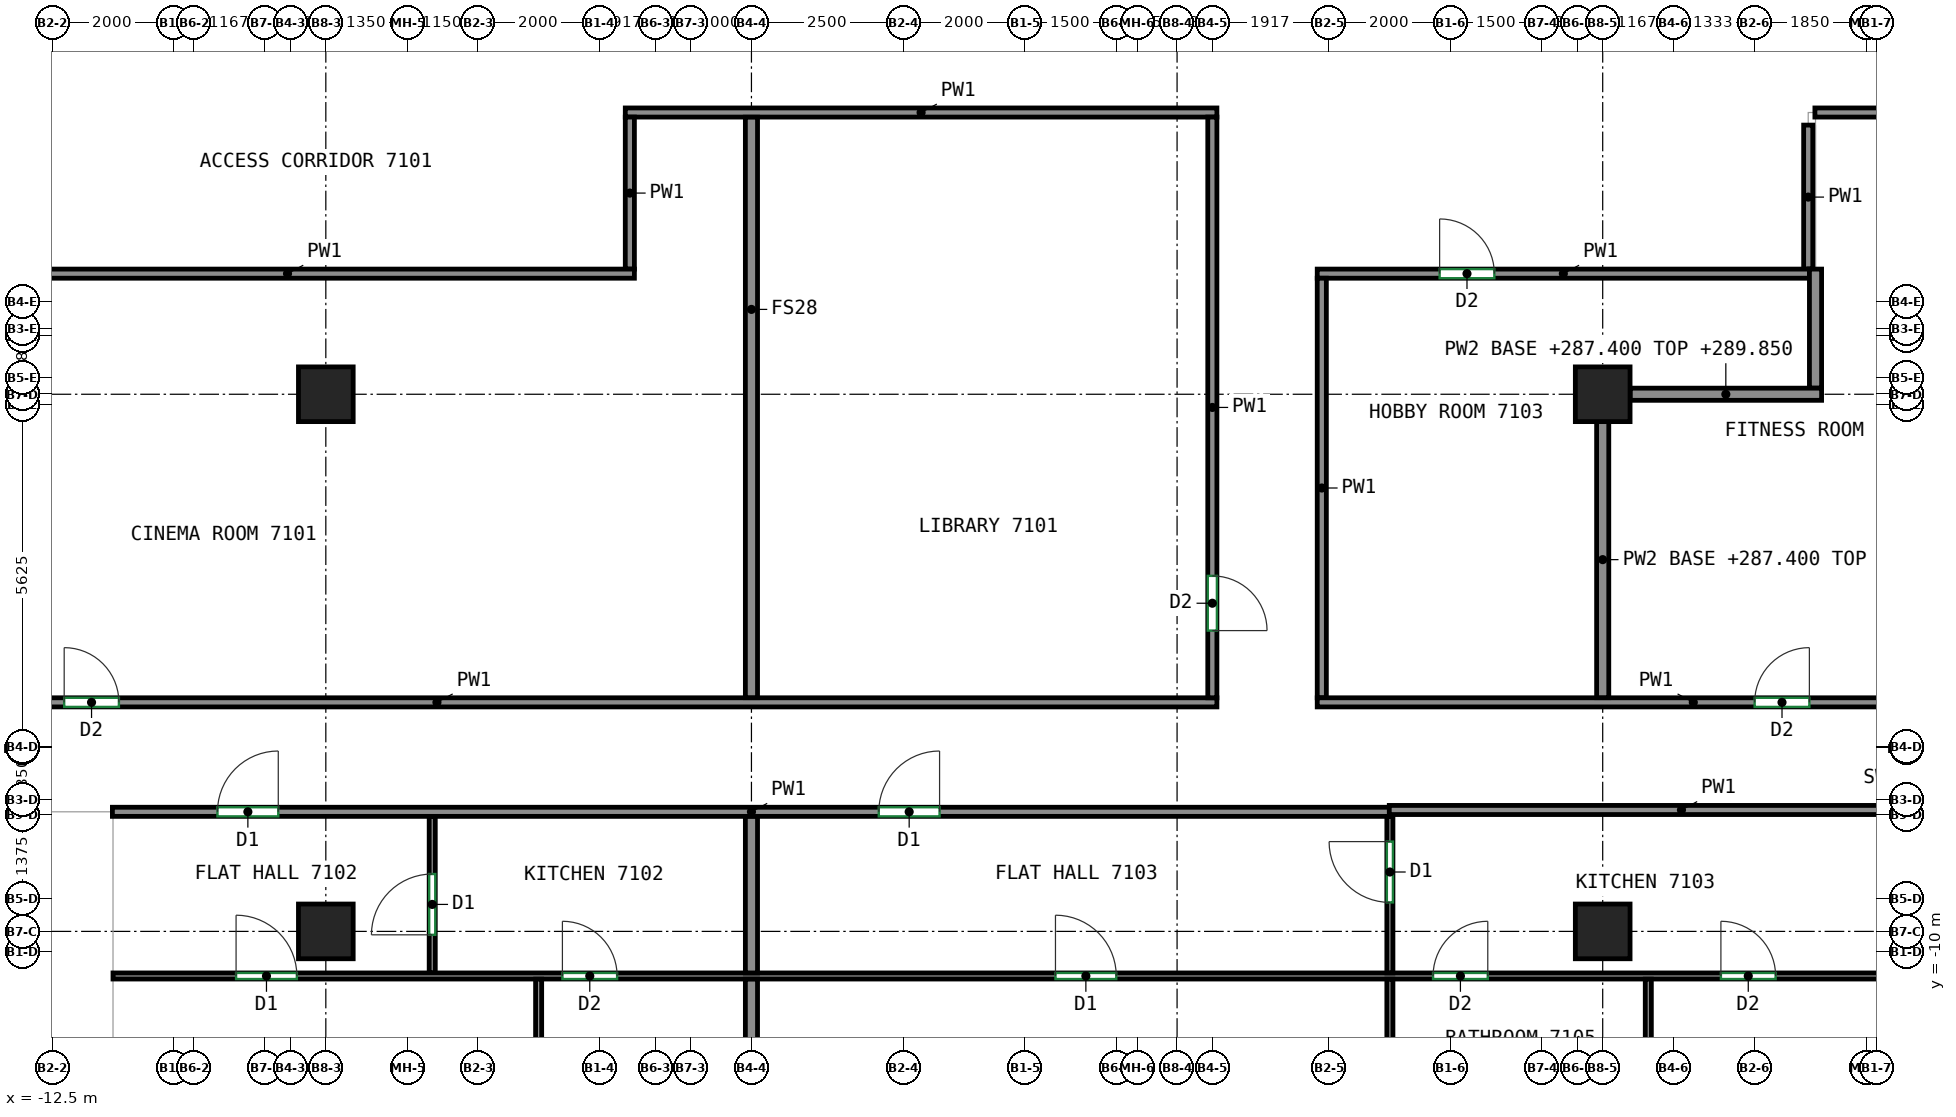
"""IFC4 building model, lengths in metres.
Left out: names, types, materials, properties, quantities, classifications, styles, units other than length and angle.
Written with IfcOpenShell. Run it as: python <this file> out.ifc"""

import sys

from ifc_helpers import new_model, si_unit, direction, frame, frame_2d, origin, origin_2d, place, context, subcontext, project, spatial, rectangle, extrude, source, transform, mapped, element, fill, save


model = new_model("IFC4")
c1 = context("Model", 3, precision=1e-05, world=origin(), true_north=direction((0.0, 1.0)))
c2 = subcontext(c1, "Body", "Model", "MODEL_VIEW")
j1 = project(units=[si_unit("LENGTHUNIT", "METRE"), si_unit("PLANEANGLEUNIT", "RADIAN")], contexts=[c1])
p1 = place(None, origin())
s1 = spatial("IfcSite", under=j1, at=p1, CompositionType="ELEMENT")
p2 = place(p1, origin())
s2 = spatial("IfcBuilding", under=s1, at=p2, CompositionType="ELEMENT")
p3 = place(p2, frame((0.0, 0.0, 287.4)))
s3 = spatial("IfcBuildingStorey", under=s2, at=p3, CompositionType="ELEMENT", Elevation=287.4)
m1 = source(origin(), c2, "Body", "SweptSolid", [
    extrude(rectangle(XDim=0.9, YDim=0.9, at=origin_2d()), origin(), (0.0, 0.0, 1.0), 3.0),
])
for number, where, z_axis, x_axis in (
    (1, (-8.0, -9.667, 0.0), (0.0, 0.0, 1.0), (1.0, 0.0, 0.0)),
    (2, (-8.0, -0.833, 0.0), (0.0, 0.0, 1.0), (1.0, 0.0, 0.0)),
    (3, (13.0, -9.667, 0.0), (0.0, 0.0, 1.0), (1.0, 0.0, 0.0)),
    (4, (13.0, -0.833, 0.0), (0.0, 0.0, 1.0), (1.0, 0.0, 0.0)),
):
    element("IfcColumn", number, at=place(p3, frame(where, z_axis=z_axis, x_axis=x_axis)), inside=s3, PredefinedType="COLUMN", context=c2, shape_type="MappedRepresentation", body=[
        mapped(m1, transform((0.0, 0.0, 0.0))),
    ])
p4 = place(p3, frame((-19.0, -5.9, 0.0), z_axis=(0.0, 0.0, 1.0), x_axis=(1.0, 0.0, 0.0)))
e5 = element("IfcWall", 5, at=p4, inside=s3, PredefinedType="PARTITIONING", context=c2, shape_type="SweptSolid", body=[
    extrude(rectangle(XDim=25.655, YDim=0.15, at=frame_2d((12.828, 0.0))), origin(), (0.0, 0.0, 1.0), 3.0),
])
p5 = place(p4, frame((6.697, 0.0, 0.0)))
e6 = element("IfcOpeningElement", 6, at=p5, cuts=e5, PredefinedType="OPENING", context=c2, shape_type="SweptSolid", body=[
    extrude(rectangle(XDim=0.9, YDim=2.1, at=frame_2d((0.45, 1.05))), frame((0.0, 0.085, 0.0), z_axis=(0.0, -1.0, 0.0), x_axis=(1.0, 0.0, 0.0)), (0.0, 0.0, 1.0), 0.17),
])
p6 = place(p3, frame((-11.51, -7.7, 0.0), z_axis=(0.0, 0.0, 1.0), x_axis=(1.0, 0.0, 0.0)))
e7 = element("IfcWall", 7, at=p6, inside=s3, PredefinedType="PARTITIONING", context=c2, shape_type="SweptSolid", body=[
    extrude(rectangle(XDim=21.02, YDim=0.15, at=frame_2d((10.51, 0.0))), origin(), (0.0, 0.0, 1.0), 3.0),
])
p7 = place(p6, frame((1.728, 0.0, 0.0)))
e8 = element("IfcOpeningElement", 8, at=p7, cuts=e7, PredefinedType="OPENING", context=c2, shape_type="SweptSolid", body=[
    extrude(rectangle(XDim=1.0, YDim=2.1, at=frame_2d((0.5, 1.05))), frame((0.0, 0.085, 0.0), z_axis=(0.0, -1.0, 0.0), x_axis=(1.0, 0.0, 0.0)), (0.0, 0.0, 1.0), 0.17),
])
p8 = place(p6, frame((12.604, 0.0, 0.0)))
e9 = element("IfcOpeningElement", 9, at=p8, cuts=e7, PredefinedType="OPENING", context=c2, shape_type="SweptSolid", body=[
    extrude(rectangle(XDim=1.0, YDim=2.1, at=frame_2d((0.5, 1.05))), frame((0.0, 0.085, 0.0), z_axis=(0.0, -1.0, 0.0), x_axis=(1.0, 0.0, 0.0)), (0.0, 0.0, 1.0), 0.17),
])
p9 = place(p3, frame((9.49, -7.67, 0.0), z_axis=(0.0, 0.0, 1.0), x_axis=(1.0, 0.0, 0.0)))
e10 = element("IfcWall", 10, at=p9, inside=s3, PredefinedType="PARTITIONING", context=c2, shape_type="SweptSolid", body=[
    extrude(rectangle(XDim=9.61, YDim=0.15, at=frame_2d((4.805, 0.0))), origin(), (0.0, 0.0, 1.0), 3.0),
])
p10 = place(p3, frame((-3.075, 3.8, 0.0), z_axis=(0.0, 0.0, 1.0), x_axis=(1.0, 0.0, 0.0)))
e11 = element("IfcWall", 11, at=p10, inside=s3, PredefinedType="PARTITIONING", context=c2, shape_type="SweptSolid", body=[
    extrude(rectangle(XDim=9.73, YDim=0.15, at=frame_2d((4.865, 0.0))), origin(), (0.0, 0.0, 1.0), 3.0),
])
p11 = place(p3, frame((-3.0, 1.225, 0.0), z_axis=(0.0, 0.0, 1.0), x_axis=(0.0, 1.0, 0.0)))
e12 = element("IfcWall", 12, at=p11, inside=s3, PredefinedType="PARTITIONING", context=c2, shape_type="SweptSolid", body=[
    extrude(rectangle(XDim=2.5, YDim=0.15, at=frame_2d((1.25, 0.0))), origin(), (0.0, 0.0, 1.0), 3.0),
])
p12 = place(p3, frame((-14.335, 1.15, 0.0), z_axis=(0.0, 0.0, 1.0), x_axis=(1.0, 0.0, 0.0)))
e13 = element("IfcWall", 13, at=p12, inside=s3, PredefinedType="PARTITIONING", context=c2, shape_type="SweptSolid", body=[
    extrude(rectangle(XDim=11.41, YDim=0.15, at=frame_2d((5.705, 0.0))), origin(), (0.0, 0.0, 1.0), 3.0),
])
p13 = place(p3, frame((6.58, 3.725, 0.0), z_axis=(0.0, 0.0, 1.0), x_axis=(0.0, -1.0, 0.0)))
e14 = element("IfcWall", 14, at=p13, inside=s3, PredefinedType="PARTITIONING", context=c2, shape_type="SweptSolid", body=[
    extrude(rectangle(XDim=9.55, YDim=0.15, at=frame_2d((4.775, 0.0))), origin(), (0.0, 0.0, 1.0), 3.0),
])
p14 = place(p13, frame((7.545, 0.0, 0.0)))
e15 = element("IfcOpeningElement", 15, at=p14, cuts=e14, PredefinedType="OPENING", context=c2, shape_type="SweptSolid", body=[
    extrude(rectangle(XDim=0.9, YDim=2.1, at=frame_2d((0.45, 1.05))), frame((0.0, 0.085, 0.0), z_axis=(0.0, -1.0, 0.0), x_axis=(1.0, 0.0, 0.0)), (0.0, 0.0, 1.0), 0.17),
])
p15 = place(p3, frame((16.38, 1.225, 0.0), z_axis=(0.0, 0.0, 1.0), x_axis=(0.0, 1.0, 0.0)))
e16 = element("IfcWall", 16, at=p15, inside=s3, PredefinedType="PARTITIONING", context=c2, shape_type="SweptSolid", body=[
    extrude(rectangle(XDim=2.368, YDim=0.15, at=frame_2d((1.184, 0.0))), origin(), (0.0, 0.0, 1.0), 3.0),
])
p16 = place(p3, frame((8.305, 1.15, 0.0), z_axis=(0.0, 0.0, 1.0), x_axis=(1.0, 0.0, 0.0)))
e17 = element("IfcWall", 17, at=p16, inside=s3, PredefinedType="PARTITIONING", context=c2, shape_type="SweptSolid", body=[
    extrude(rectangle(XDim=8.095, YDim=0.15, at=frame_2d((4.047, 0.0))), origin(), (0.0, 0.0, 1.0), 3.0),
])
p17 = place(p16, frame((2.013, 0.0, 0.0)))
e18 = element("IfcOpeningElement", 18, at=p17, cuts=e17, PredefinedType="OPENING", context=c2, shape_type="SweptSolid", body=[
    extrude(rectangle(XDim=0.9, YDim=2.1, at=frame_2d((0.45, 1.05))), frame((0.0, 0.085, 0.0), z_axis=(0.0, -1.0, 0.0), x_axis=(1.0, 0.0, 0.0)), (0.0, 0.0, 1.0), 0.17),
])
p18 = place(p3, frame((8.38, -5.825, 0.0), z_axis=(0.0, 0.0, 1.0), x_axis=(0.0, 1.0, 0.0)))
e19 = element("IfcWall", 19, at=p18, inside=s3, PredefinedType="PARTITIONING", context=c2, shape_type="SweptSolid", body=[
    extrude(rectangle(XDim=6.9, YDim=0.15, at=frame_2d((3.45, 0.0))), origin(), (0.0, 0.0, 1.0), 3.0),
])
p19 = place(p3, frame((8.305, -5.9, 0.0), z_axis=(0.0, 0.0, 1.0), x_axis=(1.0, 0.0, 0.0)))
e20 = element("IfcWall", 20, at=p19, inside=s3, PredefinedType="PARTITIONING", context=c2, shape_type="SweptSolid", body=[
    extrude(rectangle(XDim=12.37, YDim=0.15, at=frame_2d((6.185, 0.0))), origin(), (0.0, 0.0, 1.0), 3.0),
])
p20 = place(p19, frame((7.194, 0.0, 0.0)))
e21 = element("IfcOpeningElement", 21, at=p20, cuts=e20, PredefinedType="OPENING", context=c2, shape_type="SweptSolid", body=[
    extrude(rectangle(XDim=0.9, YDim=2.1, at=frame_2d((0.45, 1.05))), frame((0.0, 0.085, 0.0), z_axis=(0.0, -1.0, 0.0), x_axis=(1.0, 0.0, 0.0)), (0.0, 0.0, 1.0), 0.17),
])
p21 = place(p3, frame((16.49, 3.8, 0.0), z_axis=(0.0, 0.0, 1.0), x_axis=(1.0, 0.0, 0.0)))
e22 = element("IfcWall", 22, at=p21, inside=s3, PredefinedType="PARTITIONING", context=c2, shape_type="SweptSolid", body=[
    extrude(rectangle(XDim=4.085, YDim=0.15, at=frame_2d((2.042, 0.0))), origin(), (0.0, 0.0, 1.0), 3.0),
])
p22 = place(p3, frame((-6.25, -10.35, 0.0), z_axis=(0.0, 0.0, 1.0), x_axis=(0.0, 1.0, 0.0)))
e23 = element("IfcWall", 23, at=p22, inside=s3, PredefinedType="PARTITIONING", context=c2, shape_type="SweptSolid", body=[
    extrude(rectangle(XDim=2.573, YDim=0.1, at=frame_2d((1.287, 0.0))), origin(), (0.0, 0.0, 1.0), 3.0),
])
p23 = place(p22, frame((0.627, 0.0, 0.0)))
e24 = element("IfcOpeningElement", 24, at=p23, cuts=e23, PredefinedType="OPENING", context=c2, shape_type="SweptSolid", body=[
    extrude(rectangle(XDim=1.0, YDim=2.1, at=frame_2d((0.5, 1.05))), frame((0.0, 0.06, 0.0), z_axis=(0.0, -1.0, 0.0), x_axis=(1.0, 0.0, 0.0)), (0.0, 0.0, 1.0), 0.12),
])
p24 = place(p3, frame((-11.5, -10.4, 0.0), z_axis=(0.0, 0.0, 1.0), x_axis=(1.0, 0.0, 0.0)))
e25 = element("IfcWall", 25, at=p24, inside=s3, PredefinedType="PARTITIONING", context=c2, shape_type="SweptSolid", body=[
    extrude(rectangle(XDim=29.25, YDim=0.1, at=frame_2d((14.625, 0.0))), origin(), (0.0, 0.0, 1.0), 3.0),
])
p25 = place(p24, frame((2.024, 0.0, 0.0)))
e26 = element("IfcOpeningElement", 26, at=p25, cuts=e25, PredefinedType="OPENING", context=c2, shape_type="SweptSolid", body=[
    extrude(rectangle(XDim=1.0, YDim=2.1, at=frame_2d((0.5, 1.05))), frame((0.0, 0.06, 0.0), z_axis=(0.0, -1.0, 0.0), x_axis=(1.0, 0.0, 0.0)), (0.0, 0.0, 1.0), 0.12),
])
p26 = place(p24, frame((7.391, 0.0, 0.0)))
e27 = element("IfcOpeningElement", 27, at=p26, cuts=e25, PredefinedType="OPENING", context=c2, shape_type="SweptSolid", body=[
    extrude(rectangle(XDim=0.9, YDim=2.1, at=frame_2d((0.45, 1.05))), frame((0.0, 0.06, 0.0), z_axis=(0.0, -1.0, 0.0), x_axis=(1.0, 0.0, 0.0)), (0.0, 0.0, 1.0), 0.12),
])
p27 = place(p24, frame((15.5, 0.0, 0.0)))
e28 = element("IfcOpeningElement", 28, at=p27, cuts=e25, PredefinedType="OPENING", context=c2, shape_type="SweptSolid", body=[
    extrude(rectangle(XDim=1.0, YDim=2.1, at=frame_2d((0.5, 1.05))), frame((0.0, 0.06, 0.0), z_axis=(0.0, -1.0, 0.0), x_axis=(1.0, 0.0, 0.0)), (0.0, 0.0, 1.0), 0.12),
])
p28 = place(p24, frame((21.71, 0.0, 0.0)))
e29 = element("IfcOpeningElement", 29, at=p28, cuts=e25, PredefinedType="OPENING", context=c2, shape_type="SweptSolid", body=[
    extrude(rectangle(XDim=0.9, YDim=2.1, at=frame_2d((0.45, 1.05))), frame((0.0, 0.06, 0.0), z_axis=(0.0, -1.0, 0.0), x_axis=(1.0, 0.0, 0.0)), (0.0, 0.0, 1.0), 0.12),
])
p29 = place(p24, frame((26.444, 0.0, 0.0)))
e30 = element("IfcOpeningElement", 30, at=p29, cuts=e25, PredefinedType="OPENING", context=c2, shape_type="SweptSolid", body=[
    extrude(rectangle(XDim=0.9, YDim=2.1, at=frame_2d((0.45, 1.05))), frame((0.0, 0.06, 0.0), z_axis=(0.0, -1.0, 0.0), x_axis=(1.0, 0.0, 0.0)), (0.0, 0.0, 1.0), 0.12),
])
p30 = place(p3, frame((-1.0, -10.35, 0.0), z_axis=(0.0, 0.0, 1.0), x_axis=(0.0, 1.0, 0.0)))
e31 = element("IfcWall", 31, at=p30, inside=s3, PredefinedType="PARTITIONING", context=c2, shape_type="SweptSolid", body=[
    extrude(rectangle(XDim=2.573, YDim=0.2, at=frame_2d((1.287, 0.0))), origin(), (0.0, 0.0, 1.0), 3.0),
])
p31 = place(p3, frame((-4.5, -18.25, 0.0), z_axis=(0.0, 0.0, 1.0), x_axis=(0.0, 1.0, 0.0)))
e32 = element("IfcWall", 32, at=p31, inside=s3, PredefinedType="PARTITIONING", context=c2, shape_type="SweptSolid", body=[
    extrude(rectangle(XDim=7.798, YDim=0.1, at=frame_2d((3.899, 0.0))), origin(), (0.0, 0.0, 1.0), 3.0),
])
p32 = place(p3, frame((-1.0, -17.725, 0.0), z_axis=(0.0, 0.0, 1.0), x_axis=(0.0, 1.0, 0.0)))
e33 = element("IfcWall", 33, at=p32, inside=s3, PredefinedType="PARTITIONING", context=c2, shape_type="SweptSolid", body=[
    extrude(rectangle(XDim=7.273, YDim=0.2, at=frame_2d((3.637, 0.0))), origin(), (0.0, 0.0, 1.0), 3.0),
])
p33 = place(p3, frame((9.5, -10.35, 0.0), z_axis=(0.0, 0.0, 1.0), x_axis=(0.0, 1.0, 0.0)))
e34 = element("IfcWall", 34, at=p33, inside=s3, PredefinedType="PARTITIONING", context=c2, shape_type="SweptSolid", body=[
    extrude(rectangle(XDim=2.573, YDim=0.1, at=frame_2d((1.287, 0.0))), origin(), (0.0, 0.0, 1.0), 3.0),
])
p34 = place(p33, frame((1.16, 0.0, 0.0)))
e35 = element("IfcOpeningElement", 35, at=p34, cuts=e34, PredefinedType="OPENING", context=c2, shape_type="SweptSolid", body=[
    extrude(rectangle(XDim=1.0, YDim=2.1, at=frame_2d((0.5, 1.05))), frame((0.0, 0.06, 0.0), z_axis=(0.0, -1.0, 0.0), x_axis=(1.0, 0.0, 0.0)), (0.0, 0.0, 1.0), 0.12),
])
for number, where, z_axis, x_axis in (
    (36, (9.5, -12.36, 0.0), (0.0, 0.0, 1.0), (0.0, 1.0, 0.0)),
    (37, (13.75, -12.36, 0.0), (0.0, 0.0, 1.0), (0.0, 1.0, 0.0)),
):
    element("IfcWall", number, at=place(p3, frame(where, z_axis=z_axis, x_axis=x_axis)), inside=s3, PredefinedType="PARTITIONING", context=c2, shape_type="SweptSolid", body=[
        extrude(rectangle(XDim=1.908, YDim=0.1, at=frame_2d((0.954, 0.0))), origin(), (0.0, 0.0, 1.0), 3.0),
    ])
p35 = place(p3, frame((-1.0, -5.823, 0.0), z_axis=(0.0, 0.0, 1.0), x_axis=(0.0, 1.0, 0.0)))
e38 = element("IfcWall", 38, at=p35, inside=s3, PredefinedType="PARTITIONING", context=c2, shape_type="SweptSolid", body=[
    extrude(rectangle(XDim=9.546, YDim=0.2, at=frame_2d((4.773, 0.0))), origin(), (0.0, 0.0, 1.0), 3.0),
])
p36 = place(p3, frame((16.5, -0.733, 0.0), z_axis=(0.0, 0.0, 1.0), x_axis=(0.0, 1.0, 0.0)))
e39 = element("IfcWall", 39, at=p36, inside=s3, PredefinedType="PARTITIONING", context=c2, shape_type="SweptSolid", body=[
    extrude(rectangle(XDim=1.958, YDim=0.2, at=frame_2d((0.979, 0.0))), origin(), (0.0, 0.0, 1.0), 3.0),
])
p37 = place(p3, frame((13.45, -0.833, 0.0), z_axis=(0.0, 0.0, 1.0), x_axis=(1.0, 0.0, 0.0)))
e40 = element("IfcWall", 40, at=p37, inside=s3, PredefinedType="PARTITIONING", context=c2, shape_type="SweptSolid", body=[
    extrude(rectangle(XDim=3.15, YDim=0.2, at=frame_2d((1.575, 0.0))), origin(), (0.0, 0.0, 1.0), 2.45),
])
p38 = place(p3, frame((13.0, -5.823, 0.0), z_axis=(0.0, 0.0, 1.0), x_axis=(0.0, 1.0, 0.0)))
e41 = element("IfcWall", 41, at=p38, inside=s3, PredefinedType="PARTITIONING", context=c2, shape_type="SweptSolid", body=[
    extrude(rectangle(XDim=4.54, YDim=0.2, at=frame_2d((2.27, 0.0))), origin(), (0.0, 0.0, 1.0), 2.45),
])
p39 = place(p25, origin())
e42 = element("IfcDoor", 42, at=p39, inside=s3, OperationType="SINGLE_SWING_LEFT", PredefinedType="DOOR", context=c2, shape_type="SweptSolid", body=[
    extrude(rectangle(XDim=1.0, YDim=2.1, at=frame_2d((0.5, 1.05))), frame((0.0, 0.025, 0.0), z_axis=(0.0, -1.0, 0.0), x_axis=(1.0, 0.0, 0.0)), (0.0, 0.0, 1.0), 0.05),
])
fill(e26, e42)
p40 = place(p26, origin())
e43 = element("IfcDoor", 43, at=p40, inside=s3, OperationType="SINGLE_SWING_LEFT", PredefinedType="DOOR", context=c2, shape_type="SweptSolid", body=[
    extrude(rectangle(XDim=0.9, YDim=2.1, at=frame_2d((0.45, 1.05))), frame((0.0, 0.025, 0.0), z_axis=(0.0, -1.0, 0.0), x_axis=(1.0, 0.0, 0.0)), (0.0, 0.0, 1.0), 0.05),
])
fill(e27, e43)
p41 = place(p27, origin())
e44 = element("IfcDoor", 44, at=p41, inside=s3, OperationType="SINGLE_SWING_LEFT", PredefinedType="DOOR", context=c2, shape_type="SweptSolid", body=[
    extrude(rectangle(XDim=1.0, YDim=2.1, at=frame_2d((0.5, 1.05))), frame((0.0, 0.025, 0.0), z_axis=(0.0, -1.0, 0.0), x_axis=(1.0, 0.0, 0.0)), (0.0, 0.0, 1.0), 0.05),
])
fill(e28, e44)
p42 = place(p28, origin())
e45 = element("IfcDoor", 45, at=p42, inside=s3, OperationType="SINGLE_SWING_RIGHT", PredefinedType="DOOR", context=c2, shape_type="SweptSolid", body=[
    extrude(rectangle(XDim=0.9, YDim=2.1, at=frame_2d((0.45, 1.05))), frame((0.0, 0.025, 0.0), z_axis=(0.0, -1.0, 0.0), x_axis=(1.0, 0.0, 0.0)), (0.0, 0.0, 1.0), 0.05),
])
fill(e29, e45)
p43 = place(p29, origin())
e46 = element("IfcDoor", 46, at=p43, inside=s3, OperationType="SINGLE_SWING_LEFT", PredefinedType="DOOR", context=c2, shape_type="SweptSolid", body=[
    extrude(rectangle(XDim=0.9, YDim=2.1, at=frame_2d((0.45, 1.05))), frame((0.0, 0.025, 0.0), z_axis=(0.0, -1.0, 0.0), x_axis=(1.0, 0.0, 0.0)), (0.0, 0.0, 1.0), 0.05),
])
fill(e30, e46)
p44 = place(p23, origin())
e47 = element("IfcDoor", 47, at=p44, inside=s3, OperationType="SINGLE_SWING_LEFT", PredefinedType="DOOR", context=c2, shape_type="SweptSolid", body=[
    extrude(rectangle(XDim=1.0, YDim=2.1, at=frame_2d((0.5, 1.05))), frame((0.0, 0.025, 0.0), z_axis=(0.0, -1.0, 0.0), x_axis=(1.0, 0.0, 0.0)), (0.0, 0.0, 1.0), 0.05),
])
fill(e24, e47)
p45 = place(p34, origin())
e48 = element("IfcDoor", 48, at=p45, inside=s3, OperationType="SINGLE_SWING_RIGHT", PredefinedType="DOOR", context=c2, shape_type="SweptSolid", body=[
    extrude(rectangle(XDim=1.0, YDim=2.1, at=frame_2d((0.5, 1.05))), frame((0.0, 0.025, 0.0), z_axis=(0.0, -1.0, 0.0), x_axis=(1.0, 0.0, 0.0)), (0.0, 0.0, 1.0), 0.05),
])
fill(e35, e48)
p46 = place(p7, origin())
e49 = element("IfcDoor", 49, at=p46, inside=s3, OperationType="SINGLE_SWING_RIGHT", PredefinedType="DOOR", context=c2, shape_type="SweptSolid", body=[
    extrude(rectangle(XDim=1.0, YDim=2.1, at=frame_2d((0.5, 1.05))), frame((0.0, 0.025, 0.0), z_axis=(0.0, -1.0, 0.0), x_axis=(1.0, 0.0, 0.0)), (0.0, 0.0, 1.0), 0.05),
])
fill(e8, e49)
p47 = place(p8, origin())
e50 = element("IfcDoor", 50, at=p47, inside=s3, OperationType="SINGLE_SWING_RIGHT", PredefinedType="DOOR", context=c2, shape_type="SweptSolid", body=[
    extrude(rectangle(XDim=1.0, YDim=2.1, at=frame_2d((0.5, 1.05))), frame((0.0, 0.025, 0.0), z_axis=(0.0, -1.0, 0.0), x_axis=(1.0, 0.0, 0.0)), (0.0, 0.0, 1.0), 0.05),
])
fill(e9, e50)
p48 = place(p5, origin())
e51 = element("IfcDoor", 51, at=p48, inside=s3, OperationType="SINGLE_SWING_LEFT", PredefinedType="DOOR", context=c2, shape_type="SweptSolid", body=[
    extrude(rectangle(XDim=0.9, YDim=2.1, at=frame_2d((0.45, 1.05))), frame((0.0, 0.025, 0.0), z_axis=(0.0, -1.0, 0.0), x_axis=(1.0, 0.0, 0.0)), (0.0, 0.0, 1.0), 0.05),
])
fill(e6, e51)
p49 = place(p20, origin())
e52 = element("IfcDoor", 52, at=p49, inside=s3, OperationType="SINGLE_SWING_RIGHT", PredefinedType="DOOR", context=c2, shape_type="SweptSolid", body=[
    extrude(rectangle(XDim=0.9, YDim=2.1, at=frame_2d((0.45, 1.05))), frame((0.0, 0.025, 0.0), z_axis=(0.0, -1.0, 0.0), x_axis=(1.0, 0.0, 0.0)), (0.0, 0.0, 1.0), 0.05),
])
fill(e21, e52)
p50 = place(p14, origin())
e53 = element("IfcDoor", 53, at=p50, inside=s3, OperationType="SINGLE_SWING_RIGHT", PredefinedType="DOOR", context=c2, shape_type="SweptSolid", body=[
    extrude(rectangle(XDim=0.9, YDim=2.1, at=frame_2d((0.45, 1.05))), frame((0.0, 0.025, 0.0), z_axis=(0.0, -1.0, 0.0), x_axis=(1.0, 0.0, 0.0)), (0.0, 0.0, 1.0), 0.05),
])
fill(e15, e53)
p51 = place(p17, origin())
e54 = element("IfcDoor", 54, at=p51, inside=s3, OperationType="SINGLE_SWING_LEFT", PredefinedType="DOOR", context=c2, shape_type="SweptSolid", body=[
    extrude(rectangle(XDim=0.9, YDim=2.1, at=frame_2d((0.45, 1.05))), frame((0.0, 0.025, 0.0), z_axis=(0.0, -1.0, 0.0), x_axis=(1.0, 0.0, 0.0)), (0.0, 0.0, 1.0), 0.05),
])
fill(e18, e54)
save(model, sys.argv[1])
